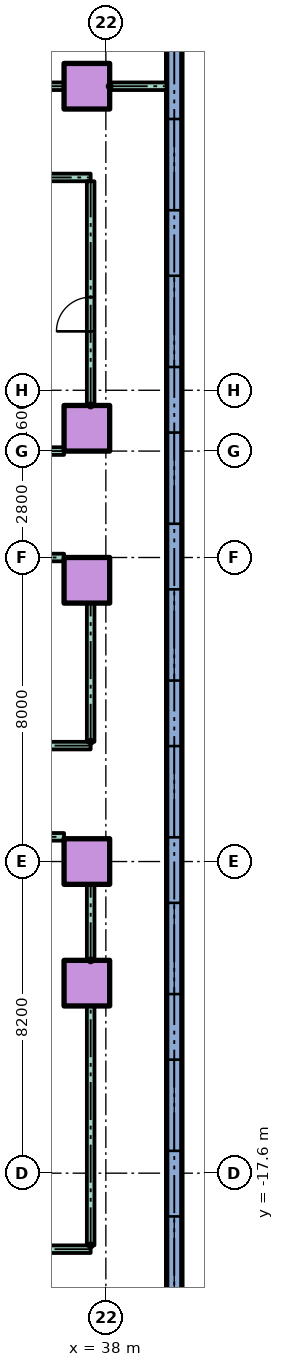
"""IFC4 building model, lengths in metres.
Left out: names, types, materials, properties, quantities, classifications, styles, units other than length and angle.
Written with IfcOpenShell. Run it as: python <this file> out.ifc"""

import sys

from ifc_helpers import new_model, si_unit, direction, frame, frame_2d, origin, origin_2d, place, context, subcontext, project, spatial, rectangle, hollow_rectangle, extrude, element, fill, save


model = new_model("IFC4")
c1 = context("Model", 3, precision=1e-05, world=origin(), true_north=direction((0.0, 1.0)))
c2 = subcontext(c1, "Body", "Model", "MODEL_VIEW")
j1 = project(units=[si_unit("LENGTHUNIT", "METRE"), si_unit("PLANEANGLEUNIT", "RADIAN")], contexts=[c1])
p1 = place(None, origin())
s1 = spatial("IfcSite", under=j1, at=p1, CompositionType="ELEMENT")
p2 = place(p1, origin())
s2 = spatial("IfcBuilding", under=s1, at=p2, CompositionType="ELEMENT")
p3 = place(p2, frame((0.0, 0.0, 10.0)))
s3 = spatial("IfcBuildingStorey", under=s2, at=p3, CompositionType="ELEMENT", Elevation=10.0)
for number, where in (
    (1, (37.5, -12.6, 0.0)),
    (2, (37.5, -9.4, 0.0)),
    (3, (37.5, -2.0, 0.0)),
    (4, (37.5, 2.0, 0.0)),
    (5, (37.5, 11.0, 0.0)),
):
    element("IfcColumn", number, at=place(p3, frame(where)), inside=s3, PredefinedType="COLUMN", context=c2, shape_type="SweptSolid", body=[
        extrude(hollow_rectangle(XDim=1.2, YDim=1.2, WallThickness=0.06, at=origin_2d()), origin(), (0.0, 0.0, 1.0), 4.0),
    ])
p4 = place(p3, frame((39.8, -50.0, 0.0), z_axis=(0.0, 0.0, 1.0), x_axis=(0.0, 1.0, 0.0)))
e6 = element("IfcWall", 6, at=p4, inside=s3, PredefinedType="STANDARD", context=c2, shape_type="SweptSolid", body=[
    extrude(rectangle(XDim=70.0, YDim=0.4, at=frame_2d((35.0, 0.0))), origin(), (0.0, 0.0, 1.0), 3.7),
])
p5 = place(p4, frame((0.75, 0.0, 0.9)))
e7 = element("IfcOpeningElement", 7, at=p5, cuts=e6, PredefinedType="OPENING", context=c2, shape_type="SweptSolid", body=[
    extrude(rectangle(XDim=2.4, YDim=2.1, at=frame_2d((1.2, 1.05))), frame((0.0, 0.21, 0.0), z_axis=(0.0, -1.0, 0.0), x_axis=(1.0, 0.0, 0.0)), (0.0, 0.0, 1.0), 0.42),
])
p6 = place(p4, frame((17.633, 0.0, 0.9)))
e8 = element("IfcOpeningElement", 8, at=p6, cuts=e6, PredefinedType="OPENING", context=c2, shape_type="SweptSolid", body=[
    extrude(rectangle(XDim=2.4, YDim=2.1, at=frame_2d((1.2, 1.05))), frame((0.0, 0.21, 0.0), z_axis=(0.0, -1.0, 0.0), x_axis=(1.0, 0.0, 0.0)), (0.0, 0.0, 1.0), 0.42),
])
p7 = place(p4, frame((21.3, 0.0, 0.9)))
e9 = element("IfcOpeningElement", 9, at=p7, cuts=e6, PredefinedType="OPENING", context=c2, shape_type="SweptSolid", body=[
    extrude(rectangle(XDim=2.4, YDim=2.1, at=frame_2d((1.2, 1.05))), frame((0.0, 0.21, 0.0), z_axis=(0.0, -1.0, 0.0), x_axis=(1.0, 0.0, 0.0)), (0.0, 0.0, 1.0), 0.42),
])
p8 = place(p4, frame((24.967, 0.0, 0.9)))
e10 = element("IfcOpeningElement", 10, at=p8, cuts=e6, PredefinedType="OPENING", context=c2, shape_type="SweptSolid", body=[
    extrude(rectangle(XDim=2.4, YDim=2.1, at=frame_2d((1.2, 1.05))), frame((0.0, 0.21, 0.0), z_axis=(0.0, -1.0, 0.0), x_axis=(1.0, 0.0, 0.0)), (0.0, 0.0, 1.0), 0.42),
])
p9 = place(p4, frame((28.863, 0.0, 0.9)))
e11 = element("IfcOpeningElement", 11, at=p9, cuts=e6, PredefinedType="OPENING", context=c2, shape_type="SweptSolid", body=[
    extrude(rectangle(XDim=2.4, YDim=2.1, at=frame_2d((1.2, 1.05))), frame((0.0, 0.21, 0.0), z_axis=(0.0, -1.0, 0.0), x_axis=(1.0, 0.0, 0.0)), (0.0, 0.0, 1.0), 0.42),
])
p10 = place(p4, frame((32.988, 0.0, 0.9)))
e12 = element("IfcOpeningElement", 12, at=p10, cuts=e6, PredefinedType="OPENING", context=c2, shape_type="SweptSolid", body=[
    extrude(rectangle(XDim=2.4, YDim=2.1, at=frame_2d((1.2, 1.05))), frame((0.0, 0.21, 0.0), z_axis=(0.0, -1.0, 0.0), x_axis=(1.0, 0.0, 0.0)), (0.0, 0.0, 1.0), 0.42),
])
p11 = place(p4, frame((37.113, 0.0, 0.9)))
e13 = element("IfcOpeningElement", 13, at=p11, cuts=e6, PredefinedType="OPENING", context=c2, shape_type="SweptSolid", body=[
    extrude(rectangle(XDim=2.4, YDim=2.1, at=frame_2d((1.2, 1.05))), frame((0.0, 0.21, 0.0), z_axis=(0.0, -1.0, 0.0), x_axis=(1.0, 0.0, 0.0)), (0.0, 0.0, 1.0), 0.42),
])
p12 = place(p4, frame((41.238, 0.0, 0.9)))
e14 = element("IfcOpeningElement", 14, at=p12, cuts=e6, PredefinedType="OPENING", context=c2, shape_type="SweptSolid", body=[
    extrude(rectangle(XDim=2.4, YDim=2.1, at=frame_2d((1.2, 1.05))), frame((0.0, 0.21, 0.0), z_axis=(0.0, -1.0, 0.0), x_axis=(1.0, 0.0, 0.0)), (0.0, 0.0, 1.0), 0.42),
])
p13 = place(p4, frame((45.363, 0.0, 0.9)))
e15 = element("IfcOpeningElement", 15, at=p13, cuts=e6, PredefinedType="OPENING", context=c2, shape_type="SweptSolid", body=[
    extrude(rectangle(XDim=2.4, YDim=2.1, at=frame_2d((1.2, 1.05))), frame((0.0, 0.21, 0.0), z_axis=(0.0, -1.0, 0.0), x_axis=(1.0, 0.0, 0.0)), (0.0, 0.0, 1.0), 0.42),
])
p14 = place(p4, frame((49.488, 0.0, 0.9)))
e16 = element("IfcOpeningElement", 16, at=p14, cuts=e6, PredefinedType="OPENING", context=c2, shape_type="SweptSolid", body=[
    extrude(rectangle(XDim=2.4, YDim=2.1, at=frame_2d((1.2, 1.05))), frame((0.0, 0.21, 0.0), z_axis=(0.0, -1.0, 0.0), x_axis=(1.0, 0.0, 0.0)), (0.0, 0.0, 1.0), 0.42),
])
p15 = place(p4, frame((53.613, 0.0, 0.9)))
e17 = element("IfcOpeningElement", 17, at=p15, cuts=e6, PredefinedType="OPENING", context=c2, shape_type="SweptSolid", body=[
    extrude(rectangle(XDim=2.4, YDim=2.1, at=frame_2d((1.2, 1.05))), frame((0.0, 0.21, 0.0), z_axis=(0.0, -1.0, 0.0), x_axis=(1.0, 0.0, 0.0)), (0.0, 0.0, 1.0), 0.42),
])
p16 = place(p4, frame((57.738, 0.0, 0.9)))
e18 = element("IfcOpeningElement", 18, at=p16, cuts=e6, PredefinedType="OPENING", context=c2, shape_type="SweptSolid", body=[
    extrude(rectangle(XDim=2.4, YDim=2.1, at=frame_2d((1.2, 1.05))), frame((0.0, 0.21, 0.0), z_axis=(0.0, -1.0, 0.0), x_axis=(1.0, 0.0, 0.0)), (0.0, 0.0, 1.0), 0.42),
])
p17 = place(p4, frame((62.05, 0.0, 0.9)))
e19 = element("IfcOpeningElement", 19, at=p17, cuts=e6, PredefinedType="OPENING", context=c2, shape_type="SweptSolid", body=[
    extrude(rectangle(XDim=2.4, YDim=2.1, at=frame_2d((1.2, 1.05))), frame((0.0, 0.21, 0.0), z_axis=(0.0, -1.0, 0.0), x_axis=(1.0, 0.0, 0.0)), (0.0, 0.0, 1.0), 0.42),
])
p18 = place(p4, frame((66.55, 0.0, 0.9)))
e20 = element("IfcOpeningElement", 20, at=p18, cuts=e6, PredefinedType="OPENING", context=c2, shape_type="SweptSolid", body=[
    extrude(rectangle(XDim=2.4, YDim=2.1, at=frame_2d((1.2, 1.05))), frame((0.0, 0.21, 0.0), z_axis=(0.0, -1.0, 0.0), x_axis=(1.0, 0.0, 0.0)), (0.0, 0.0, 1.0), 0.42),
])
p19 = place(p3, frame((-37.6, -19.6, 0.0)))
e21 = element("IfcWall", 21, at=p19, inside=s3, PredefinedType="PARTITIONING", context=c2, shape_type="SweptSolid", body=[
    extrude(rectangle(XDim=75.2, YDim=0.2, at=frame_2d((37.6, 0.0))), origin(), (0.0, 0.0, 1.0), 3.7),
])
p20 = place(p19, frame((2.97, 0.0, 0.0)))
e22 = element("IfcOpeningElement", 22, at=p20, cuts=e21, PredefinedType="OPENING", context=c2, shape_type="SweptSolid", body=[
    extrude(rectangle(XDim=1.1, YDim=2.1, at=frame_2d((0.55, 1.05))), frame((0.0, 0.11, 0.0), z_axis=(0.0, -1.0, 0.0), x_axis=(1.0, 0.0, 0.0)), (0.0, 0.0, 1.0), 0.22),
])
p21 = place(p19, frame((11.93, 0.0, 0.0)))
e23 = element("IfcOpeningElement", 23, at=p21, cuts=e21, PredefinedType="OPENING", context=c2, shape_type="SweptSolid", body=[
    extrude(rectangle(XDim=1.1, YDim=2.1, at=frame_2d((0.55, 1.05))), frame((0.0, 0.11, 0.0), z_axis=(0.0, -1.0, 0.0), x_axis=(1.0, 0.0, 0.0)), (0.0, 0.0, 1.0), 0.22),
])
p22 = place(p19, frame((21.5, 0.0, 0.0)))
e24 = element("IfcOpeningElement", 24, at=p22, cuts=e21, PredefinedType="OPENING", context=c2, shape_type="SweptSolid", body=[
    extrude(rectangle(XDim=1.0, YDim=2.1, at=frame_2d((0.5, 1.05))), frame((0.0, 0.11, 0.0), z_axis=(0.0, -1.0, 0.0), x_axis=(1.0, 0.0, 0.0)), (0.0, 0.0, 1.0), 0.22),
])
p23 = place(p19, frame((32.5, 0.0, 0.0)))
e25 = element("IfcOpeningElement", 25, at=p23, cuts=e21, PredefinedType="OPENING", context=c2, shape_type="SweptSolid", body=[
    extrude(rectangle(XDim=1.0, YDim=2.1, at=frame_2d((0.5, 1.05))), frame((0.0, 0.11, 0.0), z_axis=(0.0, -1.0, 0.0), x_axis=(1.0, 0.0, 0.0)), (0.0, 0.0, 1.0), 0.22),
])
p24 = place(p19, frame((41.5, 0.0, 0.0)))
e26 = element("IfcOpeningElement", 26, at=p24, cuts=e21, PredefinedType="OPENING", context=c2, shape_type="SweptSolid", body=[
    extrude(rectangle(XDim=1.0, YDim=2.1, at=frame_2d((0.5, 1.05))), frame((0.0, 0.11, 0.0), z_axis=(0.0, -1.0, 0.0), x_axis=(1.0, 0.0, 0.0)), (0.0, 0.0, 1.0), 0.22),
])
p25 = place(p19, frame((50.5, 0.0, 0.0)))
e27 = element("IfcOpeningElement", 27, at=p25, cuts=e21, PredefinedType="OPENING", context=c2, shape_type="SweptSolid", body=[
    extrude(rectangle(XDim=1.0, YDim=2.1, at=frame_2d((0.5, 1.05))), frame((0.0, 0.11, 0.0), z_axis=(0.0, -1.0, 0.0), x_axis=(1.0, 0.0, 0.0)), (0.0, 0.0, 1.0), 0.22),
])
p26 = place(p19, frame((59.724, 0.0, 0.0)))
e28 = element("IfcOpeningElement", 28, at=p26, cuts=e21, PredefinedType="OPENING", context=c2, shape_type="SweptSolid", body=[
    extrude(rectangle(XDim=1.0, YDim=2.1, at=frame_2d((0.5, 1.05))), frame((0.0, 0.11, 0.0), z_axis=(0.0, -1.0, 0.0), x_axis=(1.0, 0.0, 0.0)), (0.0, 0.0, 1.0), 0.22),
])
p27 = place(p19, frame((70.476, 0.0, 0.0)))
e29 = element("IfcOpeningElement", 29, at=p27, cuts=e21, PredefinedType="OPENING", context=c2, shape_type="SweptSolid", body=[
    extrude(rectangle(XDim=1.0, YDim=2.1, at=frame_2d((0.5, 1.05))), frame((0.0, 0.11, 0.0), z_axis=(0.0, -1.0, 0.0), x_axis=(1.0, 0.0, 0.0)), (0.0, 0.0, 1.0), 0.22),
])
p28 = place(p3, frame((-36.9, -8.75, 0.0)))
e30 = element("IfcWall", 30, at=p28, inside=s3, PredefinedType="PARTITIONING", context=c2, shape_type="SweptSolid", body=[
    extrude(rectangle(XDim=73.8, YDim=0.2, at=frame_2d((36.9, 0.0))), origin(), (0.0, 0.0, 1.0), 3.7),
])
p29 = place(p3, frame((-37.6, -6.35, 0.0)))
e31 = element("IfcWall", 31, at=p29, inside=s3, PredefinedType="PARTITIONING", context=c2, shape_type="SweptSolid", body=[
    extrude(rectangle(XDim=75.2, YDim=0.2, at=frame_2d((37.6, 0.0))), origin(), (0.0, 0.0, 1.0), 3.7),
])
p30 = place(p29, frame((6.5, 0.0, 0.0)))
e32 = element("IfcOpeningElement", 32, at=p30, cuts=e31, PredefinedType="OPENING", context=c2, shape_type="SweptSolid", body=[
    extrude(rectangle(XDim=1.0, YDim=2.1, at=frame_2d((0.5, 1.05))), frame((0.0, 0.11, 0.0), z_axis=(0.0, -1.0, 0.0), x_axis=(1.0, 0.0, 0.0)), (0.0, 0.0, 1.0), 0.22),
])
p31 = place(p29, frame((18.55, 0.0, 0.0)))
e33 = element("IfcOpeningElement", 33, at=p31, cuts=e31, PredefinedType="OPENING", context=c2, shape_type="SweptSolid", body=[
    extrude(rectangle(XDim=0.9, YDim=2.1, at=frame_2d((0.45, 1.05))), frame((0.0, 0.11, 0.0), z_axis=(0.0, -1.0, 0.0), x_axis=(1.0, 0.0, 0.0)), (0.0, 0.0, 1.0), 0.22),
])
p32 = place(p29, frame((27.55, 0.0, 0.0)))
e34 = element("IfcOpeningElement", 34, at=p32, cuts=e31, PredefinedType="OPENING", context=c2, shape_type="SweptSolid", body=[
    extrude(rectangle(XDim=0.9, YDim=2.1, at=frame_2d((0.45, 1.05))), frame((0.0, 0.11, 0.0), z_axis=(0.0, -1.0, 0.0), x_axis=(1.0, 0.0, 0.0)), (0.0, 0.0, 1.0), 0.22),
])
p33 = place(p29, frame((36.55, 0.0, 0.0)))
e35 = element("IfcOpeningElement", 35, at=p33, cuts=e31, PredefinedType="OPENING", context=c2, shape_type="SweptSolid", body=[
    extrude(rectangle(XDim=0.9, YDim=2.1, at=frame_2d((0.45, 1.05))), frame((0.0, 0.11, 0.0), z_axis=(0.0, -1.0, 0.0), x_axis=(1.0, 0.0, 0.0)), (0.0, 0.0, 1.0), 0.22),
])
p34 = place(p29, frame((48.5, 0.0, 0.0)))
e36 = element("IfcOpeningElement", 36, at=p34, cuts=e31, PredefinedType="OPENING", context=c2, shape_type="SweptSolid", body=[
    extrude(rectangle(XDim=1.0, YDim=2.1, at=frame_2d((0.5, 1.05))), frame((0.0, 0.11, 0.0), z_axis=(0.0, -1.0, 0.0), x_axis=(1.0, 0.0, 0.0)), (0.0, 0.0, 1.0), 0.22),
])
p35 = place(p29, frame((65.15, 0.0, 0.0)))
e37 = element("IfcOpeningElement", 37, at=p35, cuts=e31, PredefinedType="OPENING", context=c2, shape_type="SweptSolid", body=[
    extrude(rectangle(XDim=0.9, YDim=2.1, at=frame_2d((0.45, 1.05))), frame((0.0, 0.11, 0.0), z_axis=(0.0, -1.0, 0.0), x_axis=(1.0, 0.0, 0.0)), (0.0, 0.0, 1.0), 0.22),
])
p36 = place(p3, frame((14.0, -1.4, 0.0)))
e38 = element("IfcWall", 38, at=p36, inside=s3, PredefinedType="PARTITIONING", context=c2, shape_type="SweptSolid", body=[
    extrude(rectangle(XDim=22.9, YDim=0.2, at=frame_2d((11.45, 0.0))), origin(), (0.0, 0.0, 1.0), 3.7),
])
p37 = place(p3, frame((16.3, 1.4, 0.0)))
e39 = element("IfcWall", 39, at=p37, inside=s3, PredefinedType="PARTITIONING", context=c2, shape_type="SweptSolid", body=[
    extrude(rectangle(XDim=20.6, YDim=0.2, at=frame_2d((10.3, 0.0))), origin(), (0.0, 0.0, 1.0), 3.7),
])
p38 = place(p37, frame((8.05, 0.0, 0.0)))
e40 = element("IfcOpeningElement", 40, at=p38, cuts=e39, PredefinedType="OPENING", context=c2, shape_type="SweptSolid", body=[
    extrude(rectangle(XDim=1.0, YDim=2.1, at=frame_2d((0.5, 1.05))), frame((0.0, 0.11, 0.0), z_axis=(0.0, -1.0, 0.0), x_axis=(1.0, 0.0, 0.0)), (0.0, 0.0, 1.0), 0.22),
])
p39 = place(p37, frame((12.4, 0.0, 0.0)))
e41 = element("IfcOpeningElement", 41, at=p39, cuts=e39, PredefinedType="OPENING", context=c2, shape_type="SweptSolid", body=[
    extrude(rectangle(XDim=1.0, YDim=2.1, at=frame_2d((0.5, 1.05))), frame((0.0, 0.11, 0.0), z_axis=(0.0, -1.0, 0.0), x_axis=(1.0, 0.0, 0.0)), (0.0, 0.0, 1.0), 0.22),
])
p40 = place(p37, frame((16.05, 0.0, 0.0)))
e42 = element("IfcOpeningElement", 42, at=p40, cuts=e39, PredefinedType="OPENING", context=c2, shape_type="SweptSolid", body=[
    extrude(rectangle(XDim=1.0, YDim=2.1, at=frame_2d((0.5, 1.05))), frame((0.0, 0.11, 0.0), z_axis=(0.0, -1.0, 0.0), x_axis=(1.0, 0.0, 0.0)), (0.0, 0.0, 1.0), 0.22),
])
p41 = place(p3, frame((16.3, 8.6, 0.0)))
e43 = element("IfcWall", 43, at=p41, inside=s3, PredefinedType="PARTITIONING", context=c2, shape_type="SweptSolid", body=[
    extrude(rectangle(XDim=21.3, YDim=0.2, at=frame_2d((10.65, 0.0))), origin(), (0.0, 0.0, 1.0), 3.7),
])
p42 = place(p3, frame((34.5, 11.0, 0.0)))
e44 = element("IfcWall", 44, at=p42, inside=s3, PredefinedType="PARTITIONING", context=c2, shape_type="SweptSolid", body=[
    extrude(rectangle(XDim=2.4, YDim=0.2, at=frame_2d((1.2, 0.0))), origin(), (0.0, 0.0, 1.0), 3.7),
])
p43 = place(p3, frame((38.1, 11.0, 0.0)))
e45 = element("IfcWall", 45, at=p43, inside=s3, PredefinedType="PARTITIONING", context=c2, shape_type="SweptSolid", body=[
    extrude(rectangle(XDim=1.5, YDim=0.2, at=frame_2d((0.75, 0.0))), origin(), (0.0, 0.0, 1.0), 3.7),
])
p44 = place(p3, frame((37.6, -19.5, 0.0), z_axis=(0.0, 0.0, 1.0), x_axis=(0.0, 1.0, 0.0)))
e46 = element("IfcWall", 46, at=p44, inside=s3, PredefinedType="PARTITIONING", context=c2, shape_type="SweptSolid", body=[
    extrude(rectangle(XDim=6.3, YDim=0.2, at=frame_2d((3.15, 0.0))), origin(), (0.0, 0.0, 1.0), 3.7),
])
p45 = place(p3, frame((37.6, -12.0, 0.0), z_axis=(0.0, 0.0, 1.0), x_axis=(0.0, 1.0, 0.0)))
e47 = element("IfcWall", 47, at=p45, inside=s3, PredefinedType="PARTITIONING", context=c2, shape_type="SweptSolid", body=[
    extrude(rectangle(XDim=2.0, YDim=0.2, at=frame_2d((1.0, 0.0))), origin(), (0.0, 0.0, 1.0), 3.7),
])
p46 = place(p3, frame((37.6, -6.25, 0.0), z_axis=(0.0, 0.0, 1.0), x_axis=(0.0, 1.0, 0.0)))
e48 = element("IfcWall", 48, at=p46, inside=s3, PredefinedType="PARTITIONING", context=c2, shape_type="SweptSolid", body=[
    extrude(rectangle(XDim=3.65, YDim=0.2, at=frame_2d((1.825, 0.0))), origin(), (0.0, 0.0, 1.0), 3.7),
])
p47 = place(p3, frame((37.6, 2.6, 0.0), z_axis=(0.0, 0.0, 1.0), x_axis=(0.0, 1.0, 0.0)))
e49 = element("IfcWall", 49, at=p47, inside=s3, PredefinedType="PARTITIONING", context=c2, shape_type="SweptSolid", body=[
    extrude(rectangle(XDim=5.9, YDim=0.2, at=frame_2d((2.95, 0.0))), origin(), (0.0, 0.0, 1.0), 3.7),
])
p48 = place(p47, frame((1.95, 0.0, 0.0)))
e50 = element("IfcOpeningElement", 50, at=p48, cuts=e49, PredefinedType="OPENING", context=c2, shape_type="SweptSolid", body=[
    extrude(rectangle(XDim=0.9, YDim=2.1, at=frame_2d((0.45, 1.05))), frame((0.0, 0.11, 0.0), z_axis=(0.0, -1.0, 0.0), x_axis=(1.0, 0.0, 0.0)), (0.0, 0.0, 1.0), 0.22),
])
p49 = place(p9, origin())
e51 = element("IfcWindow", 51, at=p49, inside=s3, PartitioningType="SINGLE_PANEL", PredefinedType="WINDOW", context=c2, shape_type="SweptSolid", body=[
    extrude(rectangle(XDim=2.4, YDim=2.1, at=frame_2d((1.2, 1.05))), frame((0.0, 0.03, 0.0), z_axis=(0.0, -1.0, 0.0), x_axis=(1.0, 0.0, 0.0)), (0.0, 0.0, 1.0), 0.06),
])
fill(e11, e51)
p50 = place(p10, origin())
e52 = element("IfcWindow", 52, at=p50, inside=s3, PartitioningType="SINGLE_PANEL", PredefinedType="WINDOW", context=c2, shape_type="SweptSolid", body=[
    extrude(rectangle(XDim=2.4, YDim=2.1, at=frame_2d((1.2, 1.05))), frame((0.0, 0.03, 0.0), z_axis=(0.0, -1.0, 0.0), x_axis=(1.0, 0.0, 0.0)), (0.0, 0.0, 1.0), 0.06),
])
fill(e12, e52)
p51 = place(p11, origin())
e53 = element("IfcWindow", 53, at=p51, inside=s3, PartitioningType="SINGLE_PANEL", PredefinedType="WINDOW", context=c2, shape_type="SweptSolid", body=[
    extrude(rectangle(XDim=2.4, YDim=2.1, at=frame_2d((1.2, 1.05))), frame((0.0, 0.03, 0.0), z_axis=(0.0, -1.0, 0.0), x_axis=(1.0, 0.0, 0.0)), (0.0, 0.0, 1.0), 0.06),
])
fill(e13, e53)
p52 = place(p12, origin())
e54 = element("IfcWindow", 54, at=p52, inside=s3, PartitioningType="SINGLE_PANEL", PredefinedType="WINDOW", context=c2, shape_type="SweptSolid", body=[
    extrude(rectangle(XDim=2.4, YDim=2.1, at=frame_2d((1.2, 1.05))), frame((0.0, 0.03, 0.0), z_axis=(0.0, -1.0, 0.0), x_axis=(1.0, 0.0, 0.0)), (0.0, 0.0, 1.0), 0.06),
])
fill(e14, e54)
p53 = place(p13, origin())
e55 = element("IfcWindow", 55, at=p53, inside=s3, PartitioningType="SINGLE_PANEL", PredefinedType="WINDOW", context=c2, shape_type="SweptSolid", body=[
    extrude(rectangle(XDim=2.4, YDim=2.1, at=frame_2d((1.2, 1.05))), frame((0.0, 0.03, 0.0), z_axis=(0.0, -1.0, 0.0), x_axis=(1.0, 0.0, 0.0)), (0.0, 0.0, 1.0), 0.06),
])
fill(e15, e55)
p54 = place(p14, origin())
e56 = element("IfcWindow", 56, at=p54, inside=s3, PartitioningType="SINGLE_PANEL", PredefinedType="WINDOW", context=c2, shape_type="SweptSolid", body=[
    extrude(rectangle(XDim=2.4, YDim=2.1, at=frame_2d((1.2, 1.05))), frame((0.0, 0.03, 0.0), z_axis=(0.0, -1.0, 0.0), x_axis=(1.0, 0.0, 0.0)), (0.0, 0.0, 1.0), 0.06),
])
fill(e16, e56)
p55 = place(p15, origin())
e57 = element("IfcWindow", 57, at=p55, inside=s3, PartitioningType="SINGLE_PANEL", PredefinedType="WINDOW", context=c2, shape_type="SweptSolid", body=[
    extrude(rectangle(XDim=2.4, YDim=2.1, at=frame_2d((1.2, 1.05))), frame((0.0, 0.03, 0.0), z_axis=(0.0, -1.0, 0.0), x_axis=(1.0, 0.0, 0.0)), (0.0, 0.0, 1.0), 0.06),
])
fill(e17, e57)
p56 = place(p16, origin())
e58 = element("IfcWindow", 58, at=p56, inside=s3, PartitioningType="SINGLE_PANEL", PredefinedType="WINDOW", context=c2, shape_type="SweptSolid", body=[
    extrude(rectangle(XDim=2.4, YDim=2.1, at=frame_2d((1.2, 1.05))), frame((0.0, 0.03, 0.0), z_axis=(0.0, -1.0, 0.0), x_axis=(1.0, 0.0, 0.0)), (0.0, 0.0, 1.0), 0.06),
])
fill(e18, e58)
p57 = place(p48, origin())
e59 = element("IfcDoor", 59, at=p57, inside=s3, OperationType="SINGLE_SWING_LEFT", PredefinedType="DOOR", context=c2, shape_type="SweptSolid", body=[
    extrude(rectangle(XDim=0.9, YDim=2.1, at=frame_2d((0.45, 1.05))), frame((0.0, 0.025, 0.0), z_axis=(0.0, -1.0, 0.0), x_axis=(1.0, 0.0, 0.0)), (0.0, 0.0, 1.0), 0.05),
])
fill(e50, e59)
save(model, sys.argv[1])
